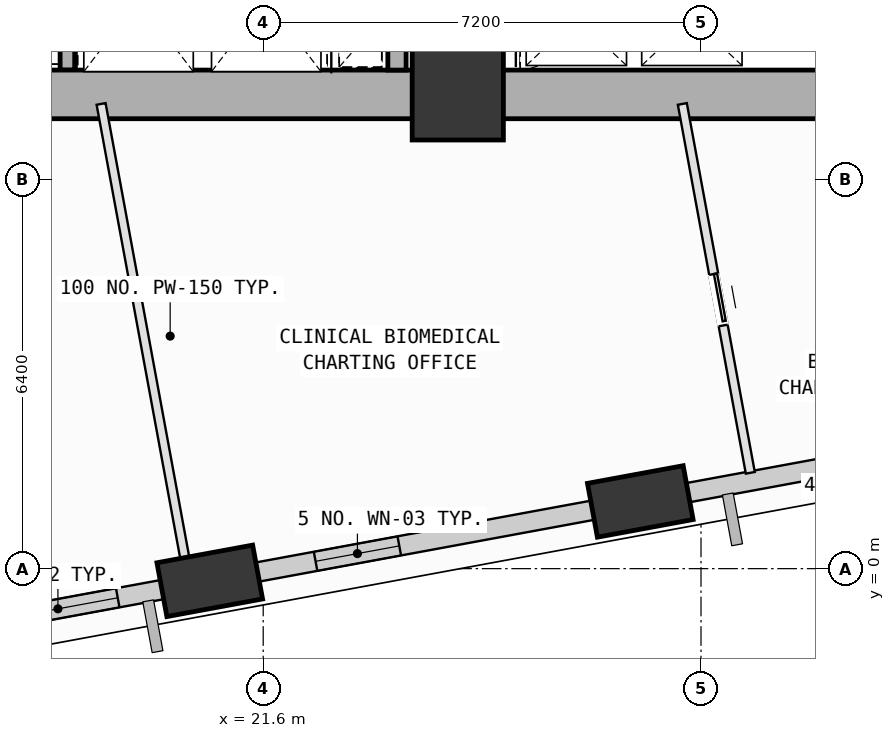
"""IFC4 building model, lengths in metres.
Left out: names, types, materials, properties, quantities, classifications, styles, units other than length and angle.
Written with IfcOpenShell. Run it as: python <this file> out.ifc"""

import sys

from ifc_helpers import new_model, si_unit, direction, frame, frame_2d, origin, origin_2d, place, context, subcontext, project, spatial, rectangle, extrude, element, fill, save


model = new_model("IFC4")
c1 = context("Model", 3, precision=1e-05, world=origin(), true_north=direction((0.0, 1.0)))
c2 = subcontext(c1, "Body", "Model", "MODEL_VIEW")
j1 = project(units=[si_unit("LENGTHUNIT", "METRE"), si_unit("PLANEANGLEUNIT", "RADIAN")], contexts=[c1])
p1 = place(None, origin())
s1 = spatial("IfcSite", under=j1, at=p1, CompositionType="ELEMENT")
p2 = place(p1, origin())
s2 = spatial("IfcBuilding", under=s1, at=p2, CompositionType="ELEMENT")
p3 = place(p2, frame((0.0, 0.0, 67.0)))
s3 = spatial("IfcBuildingStorey", under=s2, at=p3, CompositionType="ELEMENT", Elevation=67.0)
p4 = place(p3, frame((24.8, 7.8, 0.0), z_axis=(0.0, 0.0, 1.0), x_axis=(1.0, 0.0, 0.0)))
e1 = element("IfcColumn", 1, at=p4, inside=s3, PredefinedType="COLUMN", context=c2, shape_type="SweptSolid", body=[
    extrude(rectangle(XDim=1.5, YDim=1.5, at=origin_2d()), origin(), (0.0, 0.0, 1.0), 4.0),
])
p5 = place(p3, frame((20.721, -0.201, 0.002), z_axis=(0.103332373851, -0.052181938645, 0.993277134436), x_axis=(0.282481672483, 0.959042885962, 0.020996371026)))
e2 = element("IfcColumn", 2, at=p5, inside=s3, PredefinedType="COLUMN", context=c2, shape_type="SweptSolid", body=[
    extrude(rectangle(XDim=1.6, YDim=0.9, at=origin_2d()), origin(), (0.0, 0.0, 1.0), 4.024),
])
p6 = place(p3, frame((27.802, 1.105, 0.002), z_axis=(0.097912486594, -0.023095434454, 0.994927005301), x_axis=(0.0501328935, 0.998575865555, 0.018246471441)))
e3 = element("IfcColumn", 3, at=p6, inside=s3, PredefinedType="COLUMN", context=c2, shape_type="SweptSolid", body=[
    extrude(rectangle(XDim=1.6, YDim=0.9, at=origin_2d()), origin(), (0.0, 0.0, 1.0), 4.017),
])
p7 = place(p3, frame((20.322, -0.274, 0.0), z_axis=(0.0, 0.0, 1.0), x_axis=(-0.983414279578, -0.181373522662, 0.0)))
e4 = element("IfcWall", 4, at=p7, inside=s3, PredefinedType="SOLIDWALL", context=c2, shape_type="SweptSolid", body=[
    extrude(rectangle(XDim=6.034, YDim=0.32, at=frame_2d((3.017, 0.0))), origin(), (0.0, 0.0, 1.0), 3.165),
])
p8 = place(p7, frame((1.133, 0.0, 0.75)))
e5 = element("IfcOpeningElement", 5, at=p8, cuts=e4, PredefinedType="OPENING", context=c2, shape_type="SweptSolid", body=[
    extrude(rectangle(XDim=2.0, YDim=1.95, at=frame_2d((1.0, 0.975))), frame((0.0, 0.17, 0.0), z_axis=(0.0, -1.0, 0.0), x_axis=(1.0, 0.0, 0.0)), (0.0, 0.0, 1.0), 0.34),
])
p9 = place(p3, frame((27.391, 1.03, 0.0), z_axis=(0.0, 0.0, 1.0), x_axis=(-0.983411421396, -0.18138901915, 0.0)))
e6 = element("IfcWall", 6, at=p9, inside=s3, PredefinedType="SOLIDWALL", context=c2, shape_type="SweptSolid", body=[
    extrude(rectangle(XDim=6.006, YDim=0.32, at=frame_2d((3.003, 0.0))), origin(), (0.0, 0.0, 1.0), 3.165),
])
p10 = place(p9, frame((3.613, 0.0, 0.75)))
e7 = element("IfcOpeningElement", 7, at=p10, cuts=e6, PredefinedType="OPENING", context=c2, shape_type="SweptSolid", body=[
    extrude(rectangle(XDim=1.4, YDim=1.85, at=frame_2d((0.7, 0.925))), frame((0.0, 0.17, 0.0), z_axis=(0.0, -1.0, 0.0), x_axis=(1.0, 0.0, 0.0)), (0.0, 0.0, 1.0), 0.34),
])
p11 = place(p3, frame((34.466, 2.334, 0.0), z_axis=(0.0, 0.0, 1.0), x_axis=(-0.983412841191, -0.181381321478, 0.0)))
e8 = element("IfcWall", 8, at=p11, inside=s3, PredefinedType="SOLIDWALL", context=c2, shape_type="SweptSolid", body=[
    extrude(rectangle(XDim=5.99, YDim=0.32, at=frame_2d((2.995, 0.0))), origin(), (0.0, 0.0, 1.0), 3.165),
])
p12 = place(p11, frame((1.582, 0.0, 0.75)))
e9 = element("IfcOpeningElement", 9, at=p12, cuts=e8, PredefinedType="OPENING", context=c2, shape_type="SweptSolid", body=[
    extrude(rectangle(XDim=1.8, YDim=2.05, at=frame_2d((0.9, 1.025))), frame((0.0, 0.17, 0.0), z_axis=(0.0, -1.0, 0.0), x_axis=(1.0, 0.0, 0.0)), (0.0, 0.0, 1.0), 0.34),
])
p13 = place(p3, frame((18.38, 15.12, 0.0), z_axis=(0.0, 0.0, 1.0), x_axis=(0.0, -1.0, 0.0)))
e10 = element("IfcWall", 10, at=p13, inside=s3, PredefinedType="SOLIDWALL", context=c2, shape_type="SweptSolid", body=[
    extrude(rectangle(XDim=6.92, YDim=0.24, at=frame_2d((3.46, 0.0))), origin(), (0.0, 0.0, 1.0), 3.78),
])
for number, where, z_axis, x_axis in (
    (11, (14.0, 7.8, 0.0), (0.0, 0.0, 1.0), (1.0, 0.0, 0.0)),
    (12, (24.8, 7.8, 0.0), (0.0, 0.0, 1.0), (1.0, 0.0, 0.0)),
):
    element("IfcWall", number, at=place(p3, frame(where, z_axis=z_axis, x_axis=x_axis)), inside=s3, PredefinedType="SHEAR", context=c2, shape_type="SweptSolid", body=[
        extrude(rectangle(XDim=10.8, YDim=0.8, at=frame_2d((5.4, 0.0))), origin(), (0.0, 0.0, 1.0), 3.78),
    ])
p14 = place(p3, frame((23.8, 8.2, 0.0), z_axis=(0.0, 0.0, 1.0), x_axis=(0.0, 1.0, 0.0)))
e13 = element("IfcWall", 13, at=p14, inside=s3, PredefinedType="SOLIDWALL", context=c2, shape_type="SweptSolid", body=[
    extrude(rectangle(XDim=2.48, YDim=0.3, at=frame_2d((1.24, 0.0))), origin(), (0.0, 0.0, 1.0), 3.78),
])
p15 = place(p3, frame((18.934, 7.643, 0.0), z_axis=(0.0, 0.0, 1.0), x_axis=(0.181265963897, -0.983434110824, 0.0)))
e14 = element("IfcWall", 14, at=p15, inside=s3, PredefinedType="PARTITIONING", context=c2, shape_type="SweptSolid", body=[
    extrude(rectangle(XDim=7.922, YDim=0.15, at=frame_2d((3.961, 0.0))), origin(), (0.0, 0.0, 1.0), 3.78),
])
p16 = place(p3, frame((21.527, -0.286, 0.0), z_axis=(0.0, 0.0, 1.0), x_axis=(-0.983327894435, -0.181841282513, 0.0)))
e15 = element("IfcWall", 15, at=p16, inside=s3, PredefinedType="PARTITIONING", context=c2, shape_type="SweptSolid", body=[
    extrude(rectangle(XDim=0.952, YDim=0.15, at=frame_2d((0.476, 0.0))), origin(), (0.0, 0.0, 1.0), 3.165),
])
p17 = place(p3, frame((28.618, 1.022, 0.0), z_axis=(0.0, 0.0, 1.0), x_axis=(-0.983343757315, -0.18175548121, 0.0)))
e16 = element("IfcWall", 16, at=p17, inside=s3, PredefinedType="PARTITIONING", context=c2, shape_type="SweptSolid", body=[
    extrude(rectangle(XDim=1.205, YDim=0.15, at=frame_2d((0.603, 0.0))), origin(), (0.0, 0.0, 1.0), 3.165),
])
p18 = place(p3, frame((28.493, 7.643, 0.0), z_axis=(0.0, 0.0, 1.0), x_axis=(0.181246028558, -0.983437785085, 0.0)))
e17 = element("IfcWall", 17, at=p18, inside=s3, PredefinedType="PARTITIONING", context=c2, shape_type="SweptSolid", body=[
    extrude(rectangle(XDim=6.169, YDim=0.15, at=frame_2d((3.085, 0.0))), origin(), (0.0, 0.0, 1.0), 3.78),
])
p19 = place(p18, frame((2.845, 0.0, 0.0)))
e18 = element("IfcOpeningElement", 18, at=p19, cuts=e17, PredefinedType="OPENING", context=c2, shape_type="SweptSolid", body=[
    extrude(rectangle(XDim=0.86, YDim=2.06, at=frame_2d((0.43, 1.03))), frame((0.0, 0.085, 0.0), z_axis=(0.0, -1.0, 0.0), x_axis=(1.0, 0.0, 0.0)), (0.0, 0.0, 1.0), 0.17),
])
p20 = place(p8, origin())
e19 = element("IfcWindow", 19, at=p20, inside=s3, PartitioningType="SINGLE_PANEL", PredefinedType="WINDOW", context=c2, shape_type="SweptSolid", body=[
    extrude(rectangle(XDim=2.0, YDim=1.95, at=frame_2d((1.0, 0.975))), frame((0.0, 0.03, 0.0), z_axis=(0.0, -1.0, 0.0), x_axis=(1.0, 0.0, 0.0)), (0.0, 0.0, 1.0), 0.06),
])
fill(e5, e19)
p21 = place(p10, origin())
e20 = element("IfcWindow", 20, at=p21, inside=s3, PartitioningType="SINGLE_PANEL", PredefinedType="WINDOW", context=c2, shape_type="SweptSolid", body=[
    extrude(rectangle(XDim=1.4, YDim=1.85, at=frame_2d((0.7, 0.925))), frame((0.0, 0.03, 0.0), z_axis=(0.0, -1.0, 0.0), x_axis=(1.0, 0.0, 0.0)), (0.0, 0.0, 1.0), 0.06),
])
fill(e7, e20)
p22 = place(p19, origin())
e21 = element("IfcDoor", 21, at=p22, inside=s3, OperationType="SLIDING_TO_LEFT", PredefinedType="DOOR", context=c2, shape_type="SweptSolid", body=[
    extrude(rectangle(XDim=0.86, YDim=2.06, at=frame_2d((0.43, 1.03))), frame((0.0, 0.025, 0.0), z_axis=(0.0, -1.0, 0.0), x_axis=(1.0, 0.0, 0.0)), (0.0, 0.0, 1.0), 0.05),
])
fill(e18, e21)
save(model, sys.argv[1])
